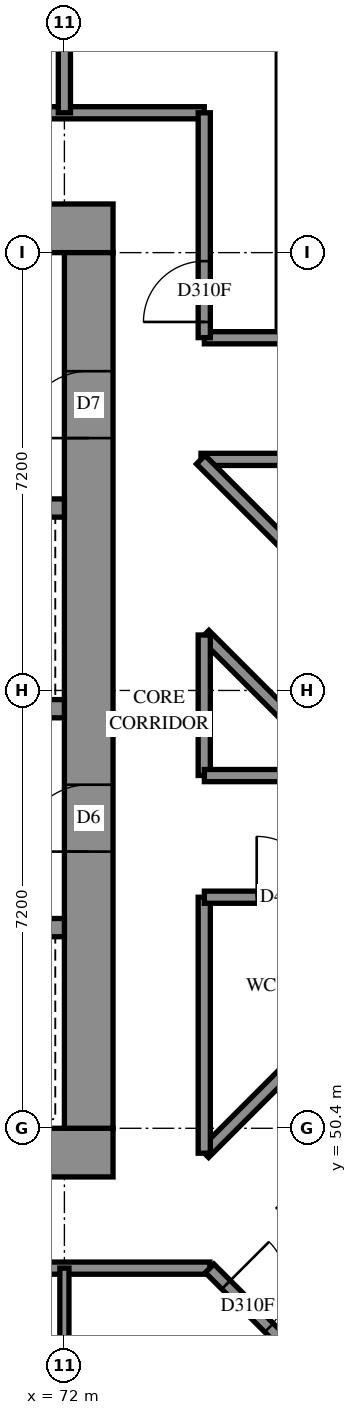
"""IFC4 building model, lengths in metres.
Left out: names, types, materials, properties, quantities, classifications, styles, units other than length and angle.
Written with IfcOpenShell. Run it as: python <this file> out.ifc"""

import sys

from ifc_helpers import new_model, si_unit, direction, frame, frame_2d, origin, place, context, subcontext, project, spatial, rectangle, extrude, element, fill, save


model = new_model("IFC4")
c1 = context("Model", 3, precision=1e-05, world=origin(), true_north=direction((0.0, 1.0)))
c2 = subcontext(c1, "Body", "Model", "MODEL_VIEW")
j1 = project(units=[si_unit("LENGTHUNIT", "METRE"), si_unit("PLANEANGLEUNIT", "RADIAN")], contexts=[c1])
p1 = place(None, origin())
s1 = spatial("IfcSite", under=j1, at=p1, CompositionType="ELEMENT")
p2 = place(p1, origin())
s2 = spatial("IfcBuilding", under=s1, at=p2, CompositionType="ELEMENT")
p3 = place(p2, frame((0.0, 0.0, 105.0)))
s3 = spatial("IfcBuildingStorey", under=s2, at=p3, CompositionType="ELEMENT", Elevation=105.0)
p4 = place(p3, frame((56.8, 50.0, -0.3), z_axis=(0.0, 0.0, 1.0), x_axis=(1.0, 0.0, 0.0)))
e1 = element("IfcWall", 1, at=p4, inside=s3, PredefinedType="SHEAR", context=c2, shape_type="SweptSolid", body=[
    extrude(rectangle(XDim=16.0, YDim=0.8, at=frame_2d((8.0, 0.0))), origin(), (0.0, 0.0, 1.0), 2.7),
])
p5 = place(p3, frame((56.8, 65.2, -0.3), z_axis=(0.0, 0.0, 1.0), x_axis=(1.0, 0.0, 0.0)))
e2 = element("IfcWall", 2, at=p5, inside=s3, PredefinedType="SHEAR", context=c2, shape_type="SweptSolid", body=[
    extrude(rectangle(XDim=16.0, YDim=0.8, at=frame_2d((8.0, 0.0))), origin(), (0.0, 0.0, 1.0), 2.7),
])
p6 = place(p5, frame((10.8, 0.0, 0.3)))
e3 = element("IfcOpeningElement", 3, at=p6, cuts=e2, PredefinedType="OPENING", context=c2, shape_type="SweptSolid", body=[
    extrude(rectangle(XDim=0.8, YDim=2.1, at=frame_2d((0.4, 1.05))), frame((0.0, 0.41, 0.0), z_axis=(0.0, -1.0, 0.0), x_axis=(1.0, 0.0, 0.0)), (0.0, 0.0, 1.0), 0.82),
])
p7 = place(p3, frame((72.4, 50.4, -0.3), z_axis=(0.0, 0.0, 1.0), x_axis=(0.0, 1.0, 0.0)))
e4 = element("IfcWall", 4, at=p7, inside=s3, PredefinedType="SHEAR", context=c2, shape_type="SweptSolid", body=[
    extrude(rectangle(XDim=14.4, YDim=0.8, at=frame_2d((7.2, 0.0))), origin(), (0.0, 0.0, 1.0), 2.7),
])
p8 = place(p7, frame((4.55, 0.0, 0.3)))
e5 = element("IfcOpeningElement", 5, at=p8, cuts=e4, PredefinedType="OPENING", context=c2, shape_type="SweptSolid", body=[
    extrude(rectangle(XDim=1.1, YDim=2.1, at=frame_2d((0.55, 1.05))), frame((0.0, 0.41, 0.0), z_axis=(0.0, -1.0, 0.0), x_axis=(1.0, 0.0, 0.0)), (0.0, 0.0, 1.0), 0.82),
])
p9 = place(p7, frame((11.35, 0.0, 0.3)))
e6 = element("IfcOpeningElement", 6, at=p9, cuts=e4, PredefinedType="OPENING", context=c2, shape_type="SweptSolid", body=[
    extrude(rectangle(XDim=1.1, YDim=2.1, at=frame_2d((0.55, 1.05))), frame((0.0, 0.41, 0.0), z_axis=(0.0, -1.0, 0.0), x_axis=(1.0, 0.0, 0.0)), (0.0, 0.0, 1.0), 0.82),
])
p10 = place(p3, frame((57.6, 53.7, 0.0), z_axis=(0.0, 0.0, 1.0), x_axis=(1.0, 0.0, 0.0)))
e7 = element("IfcWall", 7, at=p10, inside=s3, PredefinedType="SOLIDWALL", context=c2, shape_type="SweptSolid", body=[
    extrude(rectangle(XDim=14.4, YDim=0.3, at=frame_2d((7.2, 0.0))), origin(), (0.0, 0.0, 1.0), 3.1),
])
p11 = place(p10, frame((1.25, 0.0, 0.0)))
e8 = element("IfcOpeningElement", 8, at=p11, cuts=e7, PredefinedType="OPENING", context=c2, shape_type="SweptSolid", body=[
    extrude(rectangle(XDim=1.1, YDim=2.1, at=frame_2d((0.55, 1.05))), frame((0.0, 0.16, 0.0), z_axis=(0.0, -1.0, 0.0), x_axis=(1.0, 0.0, 0.0)), (0.0, 0.0, 1.0), 0.32),
])
p12 = place(p10, frame((4.85, 0.0, 0.0)))
e9 = element("IfcOpeningElement", 9, at=p12, cuts=e7, PredefinedType="OPENING", context=c2, shape_type="SweptSolid", body=[
    extrude(rectangle(XDim=1.1, YDim=2.1, at=frame_2d((0.55, 1.05))), frame((0.0, 0.16, 0.0), z_axis=(0.0, -1.0, 0.0), x_axis=(1.0, 0.0, 0.0)), (0.0, 0.0, 1.0), 0.32),
])
p13 = place(p10, frame((8.45, 0.0, 0.0)))
e10 = element("IfcOpeningElement", 10, at=p13, cuts=e7, PredefinedType="OPENING", context=c2, shape_type="SweptSolid", body=[
    extrude(rectangle(XDim=1.1, YDim=2.1, at=frame_2d((0.55, 1.05))), frame((0.0, 0.16, 0.0), z_axis=(0.0, -1.0, 0.0), x_axis=(1.0, 0.0, 0.0)), (0.0, 0.0, 1.0), 0.32),
])
p14 = place(p10, frame((12.05, 0.0, 0.0)))
e11 = element("IfcOpeningElement", 11, at=p14, cuts=e7, PredefinedType="OPENING", context=c2, shape_type="SweptSolid", body=[
    extrude(rectangle(XDim=1.1, YDim=2.1, at=frame_2d((0.55, 1.05))), frame((0.0, 0.16, 0.0), z_axis=(0.0, -1.0, 0.0), x_axis=(1.0, 0.0, 0.0)), (0.0, 0.0, 1.0), 0.32),
])
p15 = place(p3, frame((57.6, 57.3, 0.0), z_axis=(0.0, 0.0, 1.0), x_axis=(1.0, 0.0, 0.0)))
e12 = element("IfcWall", 12, at=p15, inside=s3, PredefinedType="SOLIDWALL", context=c2, shape_type="SweptSolid", body=[
    extrude(rectangle(XDim=14.4, YDim=0.3, at=frame_2d((7.2, 0.0))), origin(), (0.0, 0.0, 1.0), 3.1),
])
p16 = place(p15, frame((12.05, 0.0, 0.0)))
e13 = element("IfcOpeningElement", 13, at=p16, cuts=e12, PredefinedType="OPENING", context=c2, shape_type="SweptSolid", body=[
    extrude(rectangle(XDim=1.1, YDim=2.1, at=frame_2d((0.55, 1.05))), frame((0.0, 0.16, 0.0), z_axis=(0.0, -1.0, 0.0), x_axis=(1.0, 0.0, 0.0)), (0.0, 0.0, 1.0), 0.32),
])
p17 = place(p3, frame((64.8, 60.6, 0.0), z_axis=(0.0, 0.0, 1.0), x_axis=(1.0, 0.0, 0.0)))
e14 = element("IfcWall", 14, at=p17, inside=s3, PredefinedType="SOLIDWALL", context=c2, shape_type="SweptSolid", body=[
    extrude(rectangle(XDim=7.2, YDim=0.3, at=frame_2d((3.6, 0.0))), origin(), (0.0, 0.0, 1.0), 3.1),
])
p18 = place(p3, frame((55.3, 48.1, 0.0), z_axis=(0.0, 0.0, 1.0), x_axis=(1.0, 0.0, 0.0)))
e15 = element("IfcWall", 15, at=p18, inside=s3, PredefinedType="PARTITIONING", context=c2, shape_type="SweptSolid", body=[
    extrude(rectangle(XDim=19.092, YDim=0.2, at=frame_2d((9.546, 0.0))), origin(), (0.0, 0.0, 1.0), 3.1),
])
p19 = place(p18, frame((4.6, 0.0, 0.0)))
e16 = element("IfcOpeningElement", 16, at=p19, cuts=e15, PredefinedType="OPENING", context=c2, shape_type="SweptSolid", body=[
    extrude(rectangle(XDim=0.9, YDim=2.1, at=frame_2d((0.45, 1.05))), frame((0.0, 0.11, 0.0), z_axis=(0.0, -1.0, 0.0), x_axis=(1.0, 0.0, 0.0)), (0.0, 0.0, 1.0), 0.22),
])
p20 = place(p18, frame((8.239, 0.0, 0.0)))
e17 = element("IfcOpeningElement", 17, at=p20, cuts=e15, PredefinedType="OPENING", context=c2, shape_type="SweptSolid", body=[
    extrude(rectangle(XDim=0.9, YDim=2.1, at=frame_2d((0.45, 1.05))), frame((0.0, 0.11, 0.0), z_axis=(0.0, -1.0, 0.0), x_axis=(1.0, 0.0, 0.0)), (0.0, 0.0, 1.0), 0.22),
])
p21 = place(p18, frame((13.5, 0.0, 0.0)))
e18 = element("IfcOpeningElement", 18, at=p21, cuts=e15, PredefinedType="OPENING", context=c2, shape_type="SweptSolid", body=[
    extrude(rectangle(XDim=0.9, YDim=2.1, at=frame_2d((0.45, 1.05))), frame((0.0, 0.11, 0.0), z_axis=(0.0, -1.0, 0.0), x_axis=(1.0, 0.0, 0.0)), (0.0, 0.0, 1.0), 0.22),
])
p22 = place(p3, frame((55.3, 67.1, 0.0), z_axis=(0.0, 0.0, 1.0), x_axis=(1.0, 0.0, 0.0)))
e19 = element("IfcWall", 19, at=p22, inside=s3, PredefinedType="PARTITIONING", context=c2, shape_type="SweptSolid", body=[
    extrude(rectangle(XDim=19.0, YDim=0.2, at=frame_2d((9.5, 0.0))), origin(), (0.0, 0.0, 1.0), 3.1),
])
p23 = place(p22, frame((6.199, 0.0, 0.0)))
e20 = element("IfcOpeningElement", 20, at=p23, cuts=e19, PredefinedType="OPENING", context=c2, shape_type="SweptSolid", body=[
    extrude(rectangle(XDim=0.9, YDim=2.1, at=frame_2d((0.45, 1.05))), frame((0.0, 0.11, 0.0), z_axis=(0.0, -1.0, 0.0), x_axis=(1.0, 0.0, 0.0)), (0.0, 0.0, 1.0), 0.22),
])
p24 = place(p22, frame((13.399, 0.0, 0.0)))
e21 = element("IfcOpeningElement", 21, at=p24, cuts=e19, PredefinedType="OPENING", context=c2, shape_type="SweptSolid", body=[
    extrude(rectangle(XDim=0.9, YDim=2.1, at=frame_2d((0.45, 1.05))), frame((0.0, 0.11, 0.0), z_axis=(0.0, -1.0, 0.0), x_axis=(1.0, 0.0, 0.0)), (0.0, 0.0, 1.0), 0.22),
])
p25 = place(p3, frame((74.301, 49.991, 0.0), z_axis=(0.0, 0.0, 1.0), x_axis=(0.7071067812, 0.7071067812, 0.0)))
e22 = element("IfcWall", 22, at=p25, inside=s3, PredefinedType="PARTITIONING", context=c2, shape_type="SweptSolid", body=[
    extrude(rectangle(XDim=5.951, YDim=0.2, at=frame_2d((2.975, 0.0))), origin(), (0.0, 0.0, 1.0), 3.1),
])
p26 = place(p3, frame((74.246, 61.4, 0.0), z_axis=(0.0, 0.0, 1.0), x_axis=(1.0, 0.0, 0.0)))
e23 = element("IfcWall", 23, at=p26, inside=s3, PredefinedType="PARTITIONING", context=c2, shape_type="SweptSolid", body=[
    extrude(rectangle(XDim=4.954, YDim=0.2, at=frame_2d((2.477, 0.0))), origin(), (0.0, 0.0, 1.0), 3.1),
])
p27 = place(p3, frame((74.302, 63.4, 0.0), z_axis=(0.0, 0.0, 1.0), x_axis=(1.0, 0.0, 0.0)))
e24 = element("IfcWall", 24, at=p27, inside=s3, PredefinedType="PARTITIONING", context=c2, shape_type="SweptSolid", body=[
    extrude(rectangle(XDim=4.896, YDim=0.2, at=frame_2d((2.448, 0.0))), origin(), (0.0, 0.0, 1.0), 3.1),
])
p28 = place(p3, frame((74.243, 61.395, 0.0), z_axis=(0.0, 0.0, 1.0), x_axis=(0.7071067812, -0.7071067812, 0.0)))
e25 = element("IfcWall", 25, at=p28, inside=s3, PredefinedType="PARTITIONING", context=c2, shape_type="SweptSolid", body=[
    extrude(rectangle(XDim=4.528, YDim=0.2, at=frame_2d((2.264, 0.0))), origin(), (0.0, 0.0, 1.0), 3.1),
])
p29 = place(p28, frame((2.797, 0.0, 0.0)))
e26 = element("IfcOpeningElement", 26, at=p29, cuts=e25, PredefinedType="OPENING", context=c2, shape_type="SweptSolid", body=[
    extrude(rectangle(XDim=1.0, YDim=2.1, at=frame_2d((0.5, 1.05))), frame((0.0, 0.11, 0.0), z_axis=(0.0, -1.0, 0.0), x_axis=(1.0, 0.0, 0.0)), (0.0, 0.0, 1.0), 0.22),
])
p30 = place(p3, frame((74.388, 48.096, 0.0), z_axis=(0.0, 0.0, 1.0), x_axis=(0.7071067812, -0.7071067812, 0.0)))
e27 = element("IfcWall", 27, at=p30, inside=s3, PredefinedType="PARTITIONING", context=c2, shape_type="SweptSolid", body=[
    extrude(rectangle(XDim=4.452, YDim=0.2, at=frame_2d((2.226, 0.0))), origin(), (0.0, 0.0, 1.0), 3.1),
])
p31 = place(p30, frame((0.382, 0.0, 0.0)))
e28 = element("IfcOpeningElement", 28, at=p31, cuts=e27, PredefinedType="OPENING", context=c2, shape_type="SweptSolid", body=[
    extrude(rectangle(XDim=1.0, YDim=2.1, at=frame_2d((0.5, 1.05))), frame((0.0, 0.11, 0.0), z_axis=(0.0, -1.0, 0.0), x_axis=(1.0, 0.0, 0.0)), (0.0, 0.0, 1.0), 0.22),
])
p32 = place(p3, frame((72.0, 67.1, 0.0), z_axis=(0.0, 0.0, 1.0), x_axis=(0.0, 1.0, 0.0)))
e29 = element("IfcWall", 29, at=p32, inside=s3, PredefinedType="PARTITIONING", context=c2, shape_type="SweptSolid", body=[
    extrude(rectangle(XDim=4.4, YDim=0.2, at=frame_2d((2.2, 0.0))), origin(), (0.0, 0.0, 1.0), 3.1),
])
p33 = place(p3, frame((74.3, 49.99, 0.0), z_axis=(0.0, 0.0, 1.0), x_axis=(0.0, 1.0, 0.0)))
e30 = element("IfcWall", 30, at=p33, inside=s3, PredefinedType="PARTITIONING", context=c2, shape_type="SweptSolid", body=[
    extrude(rectangle(XDim=4.21, YDim=0.2, at=frame_2d((2.105, 0.0))), origin(), (0.0, 0.0, 1.0), 3.1),
])
p34 = place(p3, frame((74.302, 54.2, 0.0), z_axis=(0.0, 0.0, 1.0), x_axis=(1.0, 0.0, 0.0)))
e31 = element("IfcWall", 31, at=p34, inside=s3, PredefinedType="PARTITIONING", context=c2, shape_type="SweptSolid", body=[
    extrude(rectangle(XDim=4.208, YDim=0.2, at=frame_2d((2.104, 0.0))), origin(), (0.0, 0.0, 1.0), 3.1),
])
p35 = place(p34, frame((0.86, 0.0, 0.0)))
e32 = element("IfcOpeningElement", 32, at=p35, cuts=e31, PredefinedType="OPENING", context=c2, shape_type="SweptSolid", body=[
    extrude(rectangle(XDim=1.0, YDim=2.1, at=frame_2d((0.5, 1.05))), frame((0.0, 0.11, 0.0), z_axis=(0.0, -1.0, 0.0), x_axis=(1.0, 0.0, 0.0)), (0.0, 0.0, 1.0), 0.22),
])
p36 = place(p3, frame((74.3, 63.402, 0.0), z_axis=(0.0, 0.0, 1.0), x_axis=(0.0, 1.0, 0.0)))
e33 = element("IfcWall", 33, at=p36, inside=s3, PredefinedType="PARTITIONING", context=c2, shape_type="SweptSolid", body=[
    extrude(rectangle(XDim=3.698, YDim=0.2, at=frame_2d((1.849, 0.0))), origin(), (0.0, 0.0, 1.0), 3.1),
])
p37 = place(p36, frame((0.258, 0.0, 0.0)))
e34 = element("IfcOpeningElement", 34, at=p37, cuts=e33, PredefinedType="OPENING", context=c2, shape_type="SweptSolid", body=[
    extrude(rectangle(XDim=1.0, YDim=2.1, at=frame_2d((0.5, 1.05))), frame((0.0, 0.11, 0.0), z_axis=(0.0, -1.0, 0.0), x_axis=(1.0, 0.0, 0.0)), (0.0, 0.0, 1.0), 0.22),
])
p38 = place(p3, frame((74.305, 58.517, 0.0), z_axis=(0.0, 0.0, 1.0), x_axis=(0.7071067812, -0.7071067812, 0.0)))
e35 = element("IfcWall", 35, at=p38, inside=s3, PredefinedType="PARTITIONING", context=c2, shape_type="SweptSolid", body=[
    extrude(rectangle(XDim=3.27, YDim=0.2, at=frame_2d((1.635, 0.0))), origin(), (0.0, 0.0, 1.0), 3.1),
])
p39 = place(p3, frame((72.0, 45.7, 0.0), z_axis=(0.0, 0.0, 1.0), x_axis=(0.0, 1.0, 0.0)))
e36 = element("IfcWall", 36, at=p39, inside=s3, PredefinedType="PARTITIONING", context=c2, shape_type="SweptSolid", body=[
    extrude(rectangle(XDim=2.4, YDim=0.15, at=frame_2d((1.2, 0.0))), origin(), (0.0, 0.0, 1.0), 3.1),
])
for number, where, z_axis, x_axis in (
    (37, (74.3, 56.202, 0.0), (0.0, 0.0, 1.0), (0.0, 1.0, 0.0)),
    (38, (74.302, 56.2, 0.0), (0.0, 0.0, 1.0), (1.0, 0.0, 0.0)),
):
    element("IfcWall", number, at=place(p3, frame(where, z_axis=z_axis, x_axis=x_axis)), inside=s3, PredefinedType="PARTITIONING", context=c2, shape_type="SweptSolid", body=[
        extrude(rectangle(XDim=2.31, YDim=0.2, at=frame_2d((1.155, 0.0))), origin(), (0.0, 0.0, 1.0), 3.1),
    ])
p40 = place(p8, origin())
e39 = element("IfcDoor", 39, at=p40, inside=s3, OperationType="DOUBLE_DOOR_SINGLE_SWING", PredefinedType="DOOR", context=c2, shape_type="SweptSolid", body=[
    extrude(rectangle(XDim=1.1, YDim=2.1, at=frame_2d((0.55, 1.05))), frame((0.0, 0.025, 0.0), z_axis=(0.0, -1.0, 0.0), x_axis=(1.0, 0.0, 0.0)), (0.0, 0.0, 1.0), 0.05),
])
fill(e5, e39)
p41 = place(p9, origin())
e40 = element("IfcDoor", 40, at=p41, inside=s3, OperationType="SINGLE_SWING_RIGHT", PredefinedType="DOOR", context=c2, shape_type="SweptSolid", body=[
    extrude(rectangle(XDim=1.1, YDim=2.1, at=frame_2d((0.55, 1.05))), frame((0.0, 0.025, 0.0), z_axis=(0.0, -1.0, 0.0), x_axis=(1.0, 0.0, 0.0)), (0.0, 0.0, 1.0), 0.05),
])
fill(e6, e40)
p42 = place(p35, origin())
e41 = element("IfcDoor", 41, at=p42, inside=s3, OperationType="SINGLE_SWING_RIGHT", PredefinedType="DOOR", context=c2, shape_type="SweptSolid", body=[
    extrude(rectangle(XDim=1.0, YDim=2.1, at=frame_2d((0.5, 1.05))), frame((0.0, 0.025, 0.0), z_axis=(0.0, -1.0, 0.0), x_axis=(1.0, 0.0, 0.0)), (0.0, 0.0, 1.0), 0.05),
])
fill(e32, e41)
p43 = place(p37, origin())
e42 = element("IfcDoor", 42, at=p43, inside=s3, OperationType="SINGLE_SWING_RIGHT", PredefinedType="DOOR", context=c2, shape_type="SweptSolid", body=[
    extrude(rectangle(XDim=1.0, YDim=2.1, at=frame_2d((0.5, 1.05))), frame((0.0, 0.025, 0.0), z_axis=(0.0, -1.0, 0.0), x_axis=(1.0, 0.0, 0.0)), (0.0, 0.0, 1.0), 0.05),
])
fill(e34, e42)
p44 = place(p31, origin())
e43 = element("IfcDoor", 43, at=p44, inside=s3, OperationType="SINGLE_SWING_LEFT", PredefinedType="DOOR", context=c2, shape_type="SweptSolid", body=[
    extrude(rectangle(XDim=1.0, YDim=2.1, at=frame_2d((0.5, 1.05))), frame((0.0, 0.025, 0.0), z_axis=(0.0, -1.0, 0.0), x_axis=(1.0, 0.0, 0.0)), (0.0, 0.0, 1.0), 0.05),
])
fill(e28, e43)
save(model, sys.argv[1])
